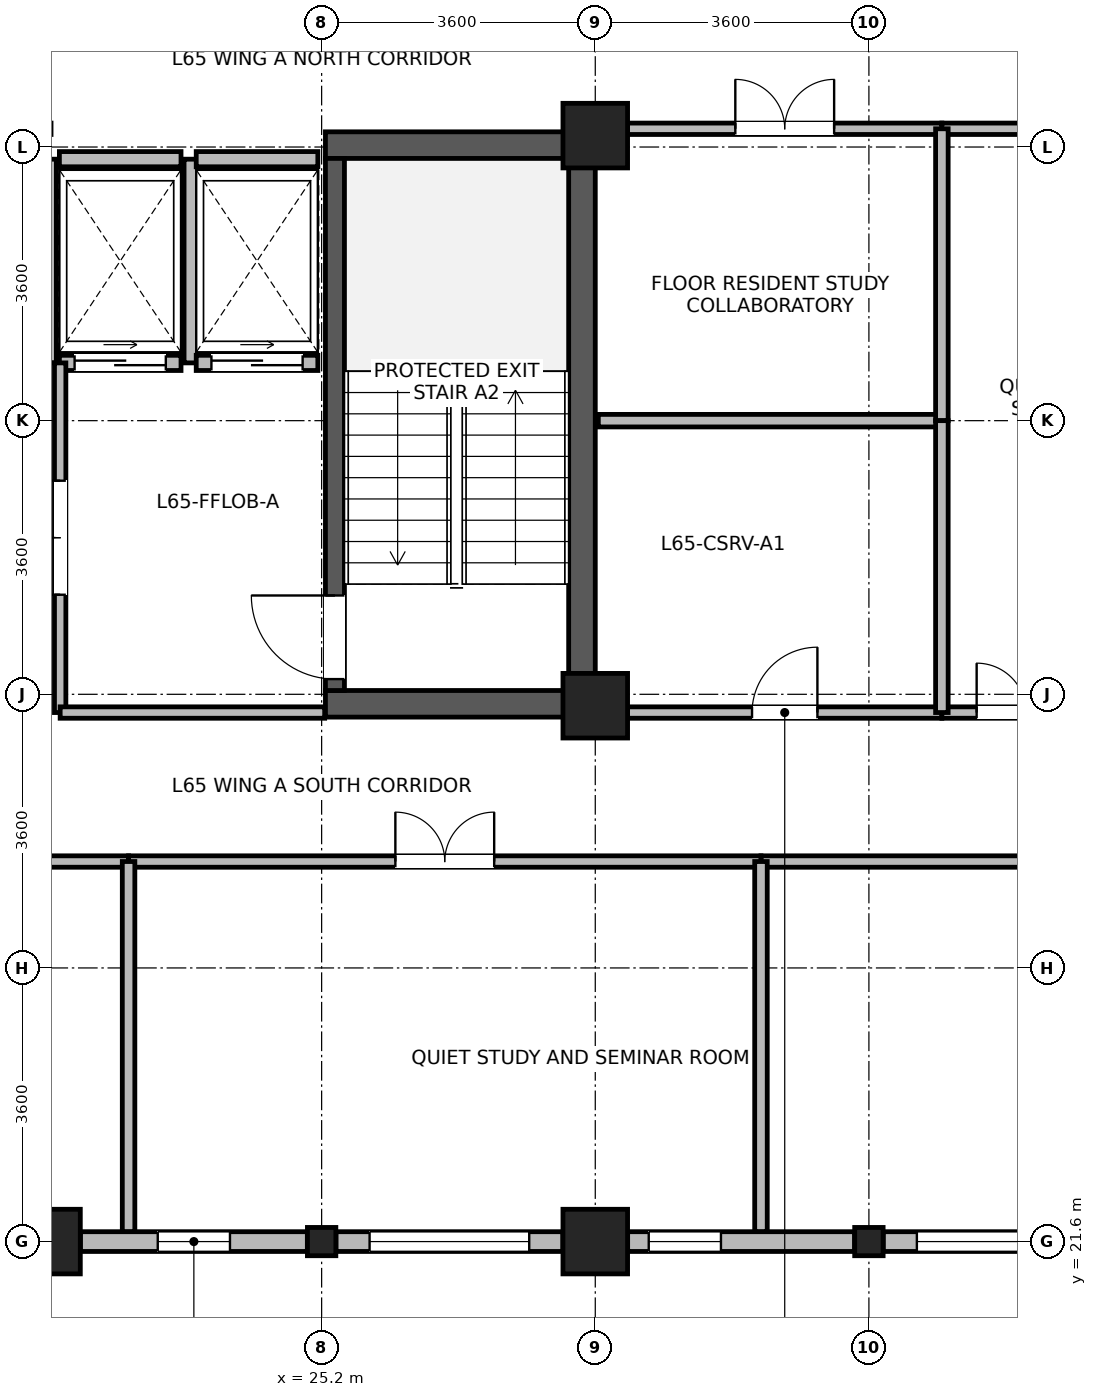
"""IFC4 building model, lengths in metres.
Left out: names, types, materials, properties, quantities, classifications, styles, units other than length and angle.
Written with IfcOpenShell. Run it as: python <this file> out.ifc"""

import sys

from ifc_helpers import new_model, si_unit, direction, frame, frame_2d, origin, origin_2d, place, context, subcontext, project, spatial, rectangle, i_section, extrude, source, transform, mapped, element, fill, save


model = new_model("IFC4")
c1 = context("Model", 3, precision=1e-05, world=origin(), true_north=direction((0.0, 1.0)))
c2 = subcontext(c1, "Body", "Model", "MODEL_VIEW")
j1 = project(units=[si_unit("LENGTHUNIT", "METRE"), si_unit("PLANEANGLEUNIT", "RADIAN")], contexts=[c1])
p1 = place(None, origin())
s1 = spatial("IfcSite", under=j1, at=p1, CompositionType="ELEMENT")
p2 = place(p1, origin())
s2 = spatial("IfcBuilding", under=s1, at=p2, CompositionType="ELEMENT")
p3 = place(p2, frame((0.0, 0.0, 253.6)))
s3 = spatial("IfcBuildingStorey", under=s2, at=p3, CompositionType="ELEMENT", Elevation=253.6)
p4 = place(p3, frame((28.625, 28.5, 0.0), z_axis=(0.0, 0.0, 1.0), x_axis=(0.0, 1.0, 0.0)))
e1 = element("IfcWall", 1, at=p4, inside=s3, PredefinedType="SHEAR", context=c2, shape_type="SweptSolid", body=[
    extrude(rectangle(XDim=7.7, YDim=0.35, at=frame_2d((3.85, 0.0))), origin(), (0.0, 0.0, 1.0), 3.475),
])
for number, where, z_axis, x_axis in (
    (2, (25.25, 28.675, 0.0), (0.0, 0.0, 1.0), (1.0, 0.0, 0.0)),
    (3, (25.25, 36.025, 0.0), (0.0, 0.0, 1.0), (1.0, 0.0, 0.0)),
):
    element("IfcWall", number, at=place(p3, frame(where, z_axis=z_axis, x_axis=x_axis)), inside=s3, PredefinedType="SHEAR", context=c2, shape_type="SweptSolid", body=[
        extrude(rectangle(XDim=3.2, YDim=0.35, at=frame_2d((1.6, 0.0))), origin(), (0.0, 0.0, 1.0), 3.475),
    ])
p5 = place(p3, frame((25.375, 28.85, 0.0), z_axis=(0.0, 0.0, 1.0), x_axis=(0.0, 1.0, 0.0)))
e4 = element("IfcWall", 4, at=p5, inside=s3, PredefinedType="SHEAR", context=c2, shape_type="SweptSolid", body=[
    extrude(rectangle(XDim=7.0, YDim=0.25, at=frame_2d((3.5, 0.0))), origin(), (0.0, 0.0, 1.0), 3.475),
])
p6 = place(p5, frame((0.15, 0.0, 0.0)))
e5 = element("IfcOpeningElement", 5, at=p6, cuts=e4, PredefinedType="OPENING", context=c2, shape_type="SweptSolid", body=[
    extrude(rectangle(XDim=1.1, YDim=2.08, at=frame_2d((0.55, 1.04))), frame((0.0, 0.135, 0.0), z_axis=(0.0, -1.0, 0.0), x_axis=(1.0, 0.0, 0.0)), (0.0, 0.0, 1.0), 0.27),
])
m1 = source(origin(), c2, "Body", "SweptSolid", [
    extrude(rectangle(XDim=0.85, YDim=0.85, at=origin_2d()), origin(), (0.0, 0.0, 1.0), 3.7),
])
for number, where, z_axis, x_axis in (
    (6, (21.6, 21.6, 0.0), (0.0, 0.0, 1.0), (1.0, 0.0, 0.0)),
    (7, (28.8, 21.6, 0.0), (0.0, 0.0, 1.0), (1.0, 0.0, 0.0)),
    (8, (28.8, 28.65, 0.0), (0.0, 0.0, 1.0), (1.0, 0.0, 0.0)),
    (9, (28.8, 36.15, 0.0), (0.0, 0.0, 1.0), (1.0, 0.0, 0.0)),
):
    element("IfcColumn", number, at=place(p3, frame(where, z_axis=z_axis, x_axis=x_axis)), inside=s3, PredefinedType="COLUMN", context=c2, shape_type="MappedRepresentation", body=[
        mapped(m1, transform((0.0, 0.0, 0.0), x_axis=(1.0, 0.0, 0.0), y_axis=(0.0, 1.0, 0.0), z_axis=(0.0, 0.0, 1.0), scale=1.0)),
    ])
m2 = source(origin(), c2, "Body", "SweptSolid", [
    extrude(i_section(OverallWidth=0.374, OverallDepth=0.372, WebThickness=0.015, FlangeThickness=0.026, FilletRadius=0.015, at=origin_2d()), origin(), (0.0, 0.0, 1.0), 3.7),
])
for number, where, z_axis, x_axis in (
    (10, (25.2, 21.6, 0.0), (0.0, 0.0, 1.0), (1.0, 0.0, 0.0)),
    (11, (32.4, 21.6, 0.0), (0.0, 0.0, 1.0), (1.0, 0.0, 0.0)),
):
    element("IfcColumn", number, at=place(p3, frame(where, z_axis=z_axis, x_axis=x_axis)), inside=s3, PredefinedType="COLUMN", context=c2, shape_type="MappedRepresentation", body=[
        mapped(m2, transform((0.0, 0.0, 0.0), x_axis=(1.0, 0.0, 0.0), y_axis=(0.0, 1.0, 0.0), z_axis=(0.0, 0.0, 1.0), scale=1.0)),
    ])
p7 = place(p3, frame((25.012, 21.6, 0.0), z_axis=(0.0, 0.0, 1.0), x_axis=(-1.0, 0.0, 0.0)))
e12 = element("IfcWall", 12, at=p7, inside=s3, PredefinedType="STANDARD", context=c2, shape_type="SweptSolid", body=[
    extrude(rectangle(XDim=2.986, YDim=0.26, at=frame_2d((1.493, 0.0))), origin(), (0.0, 0.0, 1.0), 3.055),
])
p8 = place(p7, frame((1.018, 0.0, 0.85)))
e13 = element("IfcOpeningElement", 13, at=p8, cuts=e12, PredefinedType="OPENING", context=c2, shape_type="SweptSolid", body=[
    extrude(rectangle(XDim=0.95, YDim=1.75, at=frame_2d((0.475, 0.875))), frame((0.0, 0.14, 0.0), z_axis=(0.0, -1.0, 0.0), x_axis=(1.0, 0.0, 0.0)), (0.0, 0.0, 1.0), 0.28),
])
p9 = place(p3, frame((28.374, 21.6, 0.0), z_axis=(0.0, 0.0, 1.0), x_axis=(-1.0, 0.0, 0.0)))
e14 = element("IfcWall", 14, at=p9, inside=s3, PredefinedType="STANDARD", context=c2, shape_type="SweptSolid", body=[
    extrude(rectangle(XDim=2.986, YDim=0.26, at=frame_2d((1.493, 0.0))), origin(), (0.0, 0.0, 1.0), 3.055),
])
p10 = place(p9, frame((0.443, 0.0, 0.85)))
e15 = element("IfcOpeningElement", 15, at=p10, cuts=e14, PredefinedType="OPENING", context=c2, shape_type="SweptSolid", body=[
    extrude(rectangle(XDim=2.1, YDim=1.95, at=frame_2d((1.05, 0.975))), frame((0.0, 0.14, 0.0), z_axis=(0.0, -1.0, 0.0), x_axis=(1.0, 0.0, 0.0)), (0.0, 0.0, 1.0), 0.28),
])
p11 = place(p3, frame((32.212, 21.6, 0.0), z_axis=(0.0, 0.0, 1.0), x_axis=(-1.0, 0.0, 0.0)))
e16 = element("IfcWall", 16, at=p11, inside=s3, PredefinedType="STANDARD", context=c2, shape_type="SweptSolid", body=[
    extrude(rectangle(XDim=2.986, YDim=0.26, at=frame_2d((1.493, 0.0))), origin(), (0.0, 0.0, 1.0), 3.055),
])
p12 = place(p11, frame((1.759, 0.0, 0.85)))
e17 = element("IfcOpeningElement", 17, at=p12, cuts=e16, PredefinedType="OPENING", context=c2, shape_type="SweptSolid", body=[
    extrude(rectangle(XDim=0.95, YDim=1.75, at=frame_2d((0.475, 0.875))), frame((0.0, 0.14, 0.0), z_axis=(0.0, -1.0, 0.0), x_axis=(1.0, 0.0, 0.0)), (0.0, 0.0, 1.0), 0.28),
])
p13 = place(p3, frame((35.574, 21.6, 0.0), z_axis=(0.0, 0.0, 1.0), x_axis=(-1.0, 0.0, 0.0)))
e18 = element("IfcWall", 18, at=p13, inside=s3, PredefinedType="STANDARD", context=c2, shape_type="SweptSolid", body=[
    extrude(rectangle(XDim=2.986, YDim=0.26, at=frame_2d((1.493, 0.0))), origin(), (0.0, 0.0, 1.0), 3.055),
])
p14 = place(p13, frame((0.443, 0.0, 0.85)))
e19 = element("IfcOpeningElement", 19, at=p14, cuts=e18, PredefinedType="OPENING", context=c2, shape_type="SweptSolid", body=[
    extrude(rectangle(XDim=2.1, YDim=1.95, at=frame_2d((1.05, 0.975))), frame((0.0, 0.14, 0.0), z_axis=(0.0, -1.0, 0.0), x_axis=(1.0, 0.0, 0.0)), (0.0, 0.0, 1.0), 0.28),
])
p15 = place(p3, frame((21.75, 33.16, 0.0), z_axis=(0.0, 0.0, 1.0), x_axis=(1.0, 0.0, 0.0)))
e20 = element("IfcWall", 20, at=p15, inside=s3, PredefinedType="PARTITIONING", context=c2, shape_type="SweptSolid", body=[
    extrude(rectangle(XDim=1.6, YDim=0.2, at=frame_2d((0.8, 0.0))), origin(), (0.0, 0.0, 1.0), 3.455),
])
p16 = place(p15, frame((0.2, 0.0, 0.0)))
e21 = element("IfcOpeningElement", 21, at=p16, cuts=e20, PredefinedType="OPENING", context=c2, shape_type="SweptSolid", body=[
    extrude(rectangle(XDim=1.2, YDim=2.12, at=frame_2d((0.6, 1.06))), frame((0.0, 0.11, 0.0), z_axis=(0.0, -1.0, 0.0), x_axis=(1.0, 0.0, 0.0)), (0.0, 0.0, 1.0), 0.22),
])
p17 = place(p3, frame((21.75, 35.84, 0.0), z_axis=(0.0, 0.0, 1.0), x_axis=(1.0, 0.0, 0.0)))
e22 = element("IfcWall", 22, at=p17, inside=s3, PredefinedType="PARTITIONING", context=c2, shape_type="SweptSolid", body=[
    extrude(rectangle(XDim=1.6, YDim=0.2, at=frame_2d((0.8, 0.0))), origin(), (0.0, 0.0, 1.0), 2.555),
])
for number, where, z_axis, x_axis in (
    (23, (21.61, 33.16, 0.0), (0.0, 0.0, 1.0), (0.0, 1.0, 0.0)),
    (24, (23.49, 33.16, 0.0), (0.0, 0.0, 1.0), (0.0, 1.0, 0.0)),
):
    element("IfcWall", number, at=place(p3, frame(where, z_axis=z_axis, x_axis=x_axis)), inside=s3, PredefinedType="PARTITIONING", context=c2, shape_type="SweptSolid", body=[
        extrude(rectangle(XDim=2.68, YDim=0.2, at=frame_2d((1.34, 0.0))), origin(), (0.0, 0.0, 1.0), 3.455),
    ])
p18 = place(p3, frame((23.55, 33.16, 0.0), z_axis=(0.0, 0.0, 1.0), x_axis=(1.0, 0.0, 0.0)))
e25 = element("IfcWall", 25, at=p18, inside=s3, PredefinedType="PARTITIONING", context=c2, shape_type="SweptSolid", body=[
    extrude(rectangle(XDim=1.6, YDim=0.2, at=frame_2d((0.8, 0.0))), origin(), (0.0, 0.0, 1.0), 3.455),
])
p19 = place(p18, frame((0.2, 0.0, 0.0)))
e26 = element("IfcOpeningElement", 26, at=p19, cuts=e25, PredefinedType="OPENING", context=c2, shape_type="SweptSolid", body=[
    extrude(rectangle(XDim=1.2, YDim=2.12, at=frame_2d((0.6, 1.06))), frame((0.0, 0.11, 0.0), z_axis=(0.0, -1.0, 0.0), x_axis=(1.0, 0.0, 0.0)), (0.0, 0.0, 1.0), 0.22),
])
p20 = place(p3, frame((23.55, 35.84, 0.0), z_axis=(0.0, 0.0, 1.0), x_axis=(1.0, 0.0, 0.0)))
e27 = element("IfcWall", 27, at=p20, inside=s3, PredefinedType="PARTITIONING", context=c2, shape_type="SweptSolid", body=[
    extrude(rectangle(XDim=1.6, YDim=0.2, at=frame_2d((0.8, 0.0))), origin(), (0.0, 0.0, 1.0), 2.555),
])
p21 = place(p3, frame((30.98, 26.6, 0.0), z_axis=(0.0, 0.0, 1.0), x_axis=(1.0, 0.0, 0.0)))
e28 = element("IfcWall", 28, at=p21, inside=s3, PredefinedType="PARTITIONING", context=c2, shape_type="SweptSolid", body=[
    extrude(rectangle(XDim=15.8, YDim=0.15, at=frame_2d((7.9, 0.0))), origin(), (0.0, 0.0, 1.0), 3.455),
])
p22 = place(p21, frame((7.25, 0.0, 0.0)))
e29 = element("IfcOpeningElement", 29, at=p22, cuts=e28, PredefinedType="OPENING", context=c2, shape_type="SweptSolid", body=[
    extrude(rectangle(XDim=1.3, YDim=2.12, at=frame_2d((0.65, 1.06))), frame((0.0, 0.085, 0.0), z_axis=(0.0, -1.0, 0.0), x_axis=(1.0, 0.0, 0.0)), (0.0, 0.0, 1.0), 0.17),
])
p23 = place(p3, frame((12.28, 26.6, 0.0), z_axis=(0.0, 0.0, 1.0), x_axis=(1.0, 0.0, 0.0)))
e30 = element("IfcWall", 30, at=p23, inside=s3, PredefinedType="PARTITIONING", context=c2, shape_type="SweptSolid", body=[
    extrude(rectangle(XDim=10.38, YDim=0.15, at=frame_2d((5.19, 0.0))), origin(), (0.0, 0.0, 1.0), 3.455),
])
p24 = place(p23, frame((4.54, 0.0, 0.0)))
e31 = element("IfcOpeningElement", 31, at=p24, cuts=e30, PredefinedType="OPENING", context=c2, shape_type="SweptSolid", body=[
    extrude(rectangle(XDim=1.3, YDim=2.12, at=frame_2d((0.65, 1.06))), frame((0.0, 0.085, 0.0), z_axis=(0.0, -1.0, 0.0), x_axis=(1.0, 0.0, 0.0)), (0.0, 0.0, 1.0), 0.17),
])
p25 = place(p3, frame((22.66, 26.6, 0.0), z_axis=(0.0, 0.0, 1.0), x_axis=(1.0, 0.0, 0.0)))
e32 = element("IfcWall", 32, at=p25, inside=s3, PredefinedType="PARTITIONING", context=c2, shape_type="SweptSolid", body=[
    extrude(rectangle(XDim=8.32, YDim=0.15, at=frame_2d((4.16, 0.0))), origin(), (0.0, 0.0, 1.0), 3.455),
])
p26 = place(p25, frame((3.51, 0.0, 0.0)))
e33 = element("IfcOpeningElement", 33, at=p26, cuts=e32, PredefinedType="OPENING", context=c2, shape_type="SweptSolid", body=[
    extrude(rectangle(XDim=1.3, YDim=2.12, at=frame_2d((0.65, 1.06))), frame((0.0, 0.085, 0.0), z_axis=(0.0, -1.0, 0.0), x_axis=(1.0, 0.0, 0.0)), (0.0, 0.0, 1.0), 0.17),
])
p27 = place(p3, frame((29.225, 28.56, 0.0), z_axis=(0.0, 0.0, 1.0), x_axis=(1.0, 0.0, 0.0)))
e34 = element("IfcWall", 34, at=p27, inside=s3, PredefinedType="PARTITIONING", context=c2, shape_type="SweptSolid", body=[
    extrude(rectangle(XDim=4.135, YDim=0.15, at=frame_2d((2.067, 0.0))), origin(), (0.0, 0.0, 1.0), 2.905),
])
p28 = place(p27, frame((1.637, 0.0, 0.0)))
e35 = element("IfcOpeningElement", 35, at=p28, cuts=e34, PredefinedType="OPENING", context=c2, shape_type="SweptSolid", body=[
    extrude(rectangle(XDim=0.86, YDim=2.02, at=frame_2d((0.43, 1.01))), frame((0.0, 0.085, 0.0), z_axis=(0.0, -1.0, 0.0), x_axis=(1.0, 0.0, 0.0)), (0.0, 0.0, 1.0), 0.17),
])
p29 = place(p3, frame((29.225, 36.24, 0.0), z_axis=(0.0, 0.0, 1.0), x_axis=(1.0, 0.0, 0.0)))
e36 = element("IfcWall", 36, at=p29, inside=s3, PredefinedType="PARTITIONING", context=c2, shape_type="SweptSolid", body=[
    extrude(rectangle(XDim=4.135, YDim=0.15, at=frame_2d((2.067, 0.0))), origin(), (0.0, 0.0, 1.0), 2.905),
])
p30 = place(p29, frame((1.417, 0.0, 0.0)))
e37 = element("IfcOpeningElement", 37, at=p30, cuts=e36, PredefinedType="OPENING", context=c2, shape_type="SweptSolid", body=[
    extrude(rectangle(XDim=1.3, YDim=2.12, at=frame_2d((0.65, 1.06))), frame((0.0, 0.085, 0.0), z_axis=(0.0, -1.0, 0.0), x_axis=(1.0, 0.0, 0.0)), (0.0, 0.0, 1.0), 0.17),
])
p31 = place(p3, frame((33.36, 28.56, 0.0), z_axis=(0.0, 0.0, 1.0), x_axis=(1.0, 0.0, 0.0)))
e38 = element("IfcWall", 38, at=p31, inside=s3, PredefinedType="PARTITIONING", context=c2, shape_type="SweptSolid", body=[
    extrude(rectangle(XDim=2.215, YDim=0.15, at=frame_2d((1.107, 0.0))), origin(), (0.0, 0.0, 1.0), 2.905),
])
p32 = place(p31, frame((0.458, 0.0, 0.0)))
e39 = element("IfcOpeningElement", 39, at=p32, cuts=e38, PredefinedType="OPENING", context=c2, shape_type="SweptSolid", body=[
    extrude(rectangle(XDim=1.3, YDim=2.12, at=frame_2d((0.65, 1.06))), frame((0.0, 0.085, 0.0), z_axis=(0.0, -1.0, 0.0), x_axis=(1.0, 0.0, 0.0)), (0.0, 0.0, 1.0), 0.17),
])
p33 = place(p3, frame((33.36, 36.24, 0.0), z_axis=(0.0, 0.0, 1.0), x_axis=(1.0, 0.0, 0.0)))
e40 = element("IfcWall", 40, at=p33, inside=s3, PredefinedType="PARTITIONING", context=c2, shape_type="SweptSolid", body=[
    extrude(rectangle(XDim=2.215, YDim=0.15, at=frame_2d((1.107, 0.0))), origin(), (0.0, 0.0, 1.0), 2.905),
])
for number, where, z_axis, x_axis in (
    (41, (22.66, 21.732, 0.0), (0.0, 0.0, 1.0), (0.0, 1.0, 0.0)),
    (42, (30.98, 21.732, 0.0), (0.0, 0.0, 1.0), (0.0, 1.0, 0.0)),
):
    element("IfcWall", number, at=place(p3, frame(where, z_axis=z_axis, x_axis=x_axis)), inside=s3, PredefinedType="PARTITIONING", context=c2, shape_type="SweptSolid", body=[
        extrude(rectangle(XDim=4.868, YDim=0.165, at=frame_2d((2.434, 0.0))), origin(), (0.0, 0.0, 1.0), 3.455),
    ])
p34 = place(p3, frame((21.76, 28.56, 0.0), z_axis=(0.0, 0.0, 1.0), x_axis=(0.0, 1.0, 0.0)))
e43 = element("IfcWall", 43, at=p34, inside=s3, PredefinedType="PARTITIONING", context=c2, shape_type="SweptSolid", body=[
    extrude(rectangle(XDim=4.6, YDim=0.15, at=frame_2d((2.3, 0.0))), origin(), (0.0, 0.0, 1.0), 3.455),
])
p35 = place(p34, frame((1.55, 0.0, 0.0)))
e44 = element("IfcOpeningElement", 44, at=p35, cuts=e43, PredefinedType="OPENING", context=c2, shape_type="SweptSolid", body=[
    extrude(rectangle(XDim=1.5, YDim=2.1, at=frame_2d((0.75, 1.05))), frame((0.0, 0.085, 0.0), z_axis=(0.0, -1.0, 0.0), x_axis=(1.0, 0.0, 0.0)), (0.0, 0.0, 1.0), 0.17),
])
p36 = place(p3, frame((28.84, 32.4, 0.0), z_axis=(0.0, 0.0, 1.0), x_axis=(1.0, 0.0, 0.0)))
e45 = element("IfcWall", 45, at=p36, inside=s3, PredefinedType="PARTITIONING", context=c2, shape_type="SweptSolid", body=[
    extrude(rectangle(XDim=4.52, YDim=0.165, at=frame_2d((2.26, 0.0))), origin(), (0.0, 0.0, 1.0), 3.455),
])
p37 = place(p3, frame((33.36, 32.4, 0.0), z_axis=(0.0, 0.0, 1.0), x_axis=(0.0, 1.0, 0.0)))
e46 = element("IfcWall", 46, at=p37, inside=s3, PredefinedType="PARTITIONING", context=c2, shape_type="SweptSolid", body=[
    extrude(rectangle(XDim=3.84, YDim=0.165, at=frame_2d((1.92, 0.0))), origin(), (0.0, 0.0, 1.0), 3.455),
])
p38 = place(p3, frame((33.36, 28.56, 0.0), z_axis=(0.0, 0.0, 1.0), x_axis=(0.0, 1.0, 0.0)))
e47 = element("IfcWall", 47, at=p38, inside=s3, PredefinedType="PARTITIONING", context=c2, shape_type="SweptSolid", body=[
    extrude(rectangle(XDim=3.84, YDim=0.165, at=frame_2d((1.92, 0.0))), origin(), (0.0, 0.0, 1.0), 3.455),
])
p39 = place(p3, frame((21.76, 28.56, 0.0), z_axis=(0.0, 0.0, 1.0), x_axis=(1.0, 0.0, 0.0)))
e48 = element("IfcWall", 48, at=p39, inside=s3, PredefinedType="PARTITIONING", context=c2, shape_type="SweptSolid", body=[
    extrude(rectangle(XDim=3.48, YDim=0.15, at=frame_2d((1.74, 0.0))), origin(), (0.0, 0.0, 1.0), 2.555),
])
p40 = place(p8, origin())
e49 = element("IfcWindow", 49, at=p40, inside=s3, PartitioningType="SINGLE_PANEL", PredefinedType="WINDOW", context=c2, shape_type="SweptSolid", body=[
    extrude(rectangle(XDim=0.95, YDim=1.75, at=frame_2d((0.475, 0.875))), frame((0.0, 0.03, 0.0), z_axis=(0.0, -1.0, 0.0), x_axis=(1.0, 0.0, 0.0)), (0.0, 0.0, 1.0), 0.06),
])
fill(e13, e49)
p41 = place(p10, origin())
e50 = element("IfcWindow", 50, at=p41, inside=s3, PartitioningType="SINGLE_PANEL", PredefinedType="WINDOW", context=c2, shape_type="SweptSolid", body=[
    extrude(rectangle(XDim=2.1, YDim=1.95, at=frame_2d((1.05, 0.975))), frame((0.0, 0.03, 0.0), z_axis=(0.0, -1.0, 0.0), x_axis=(1.0, 0.0, 0.0)), (0.0, 0.0, 1.0), 0.06),
])
fill(e15, e50)
p42 = place(p12, origin())
e51 = element("IfcWindow", 51, at=p42, inside=s3, PartitioningType="SINGLE_PANEL", PredefinedType="WINDOW", context=c2, shape_type="SweptSolid", body=[
    extrude(rectangle(XDim=0.95, YDim=1.75, at=frame_2d((0.475, 0.875))), frame((0.0, 0.03, 0.0), z_axis=(0.0, -1.0, 0.0), x_axis=(1.0, 0.0, 0.0)), (0.0, 0.0, 1.0), 0.06),
])
fill(e17, e51)
p43 = place(p14, origin())
e52 = element("IfcWindow", 52, at=p43, inside=s3, PartitioningType="SINGLE_PANEL", PredefinedType="WINDOW", context=c2, shape_type="SweptSolid", body=[
    extrude(rectangle(XDim=2.1, YDim=1.95, at=frame_2d((1.05, 0.975))), frame((0.0, 0.03, 0.0), z_axis=(0.0, -1.0, 0.0), x_axis=(1.0, 0.0, 0.0)), (0.0, 0.0, 1.0), 0.06),
])
fill(e19, e52)
p44 = place(p6, origin())
e53 = element("IfcDoor", 53, at=p44, inside=s3, OperationType="SINGLE_SWING_RIGHT", PredefinedType="DOOR", context=c2, shape_type="SweptSolid", body=[
    extrude(rectangle(XDim=1.1, YDim=2.08, at=frame_2d((0.55, 1.04))), frame((0.0, 0.025, 0.0), z_axis=(0.0, -1.0, 0.0), x_axis=(1.0, 0.0, 0.0)), (0.0, 0.0, 1.0), 0.05),
])
fill(e5, e53)
p45 = place(p16, origin())
e54 = element("IfcDoor", 54, at=p45, inside=s3, OperationType="SLIDING_TO_RIGHT", PredefinedType="DOOR", context=c2, shape_type="SweptSolid", body=[
    extrude(rectangle(XDim=1.2, YDim=2.12, at=frame_2d((0.6, 1.06))), frame((0.0, 0.025, 0.0), z_axis=(0.0, -1.0, 0.0), x_axis=(1.0, 0.0, 0.0)), (0.0, 0.0, 1.0), 0.05),
])
fill(e21, e54)
p46 = place(p19, origin())
e55 = element("IfcDoor", 55, at=p46, inside=s3, OperationType="SLIDING_TO_RIGHT", PredefinedType="DOOR", context=c2, shape_type="SweptSolid", body=[
    extrude(rectangle(XDim=1.2, YDim=2.12, at=frame_2d((0.6, 1.06))), frame((0.0, 0.025, 0.0), z_axis=(0.0, -1.0, 0.0), x_axis=(1.0, 0.0, 0.0)), (0.0, 0.0, 1.0), 0.05),
])
fill(e26, e55)
p47 = place(p26, origin())
e56 = element("IfcDoor", 56, at=p47, inside=s3, OperationType="DOUBLE_DOOR_SINGLE_SWING", PredefinedType="DOOR", context=c2, shape_type="SweptSolid", body=[
    extrude(rectangle(XDim=1.3, YDim=2.12, at=frame_2d((0.65, 1.06))), frame((0.0, 0.025, 0.0), z_axis=(0.0, -1.0, 0.0), x_axis=(1.0, 0.0, 0.0)), (0.0, 0.0, 1.0), 0.05),
])
fill(e33, e56)
p48 = place(p28, origin())
e57 = element("IfcDoor", 57, at=p48, inside=s3, OperationType="SINGLE_SWING_RIGHT", PredefinedType="DOOR", context=c2, shape_type="SweptSolid", body=[
    extrude(rectangle(XDim=0.86, YDim=2.02, at=frame_2d((0.43, 1.01))), frame((0.0, 0.025, 0.0), z_axis=(0.0, -1.0, 0.0), x_axis=(1.0, 0.0, 0.0)), (0.0, 0.0, 1.0), 0.05),
])
fill(e35, e57)
p49 = place(p30, origin())
e58 = element("IfcDoor", 58, at=p49, inside=s3, OperationType="DOUBLE_DOOR_SINGLE_SWING", PredefinedType="DOOR", context=c2, shape_type="SweptSolid", body=[
    extrude(rectangle(XDim=1.3, YDim=2.12, at=frame_2d((0.65, 1.06))), frame((0.0, 0.025, 0.0), z_axis=(0.0, -1.0, 0.0), x_axis=(1.0, 0.0, 0.0)), (0.0, 0.0, 1.0), 0.05),
])
fill(e37, e58)
p50 = place(p32, origin())
e59 = element("IfcDoor", 59, at=p50, inside=s3, OperationType="DOUBLE_DOOR_SINGLE_SWING", PredefinedType="DOOR", context=c2, shape_type="SweptSolid", body=[
    extrude(rectangle(XDim=1.3, YDim=2.12, at=frame_2d((0.65, 1.06))), frame((0.0, 0.025, 0.0), z_axis=(0.0, -1.0, 0.0), x_axis=(1.0, 0.0, 0.0)), (0.0, 0.0, 1.0), 0.05),
])
fill(e39, e59)
p51 = place(p35, origin())
e60 = element("IfcDoor", 60, at=p51, inside=s3, OperationType="DOUBLE_DOOR_SINGLE_SWING", PredefinedType="DOOR", context=c2, shape_type="SweptSolid", body=[
    extrude(rectangle(XDim=1.5, YDim=2.1, at=frame_2d((0.75, 1.05))), frame((0.0, 0.025, 0.0), z_axis=(0.0, -1.0, 0.0), x_axis=(1.0, 0.0, 0.0)), (0.0, 0.0, 1.0), 0.05),
])
fill(e44, e60)
save(model, sys.argv[1])
